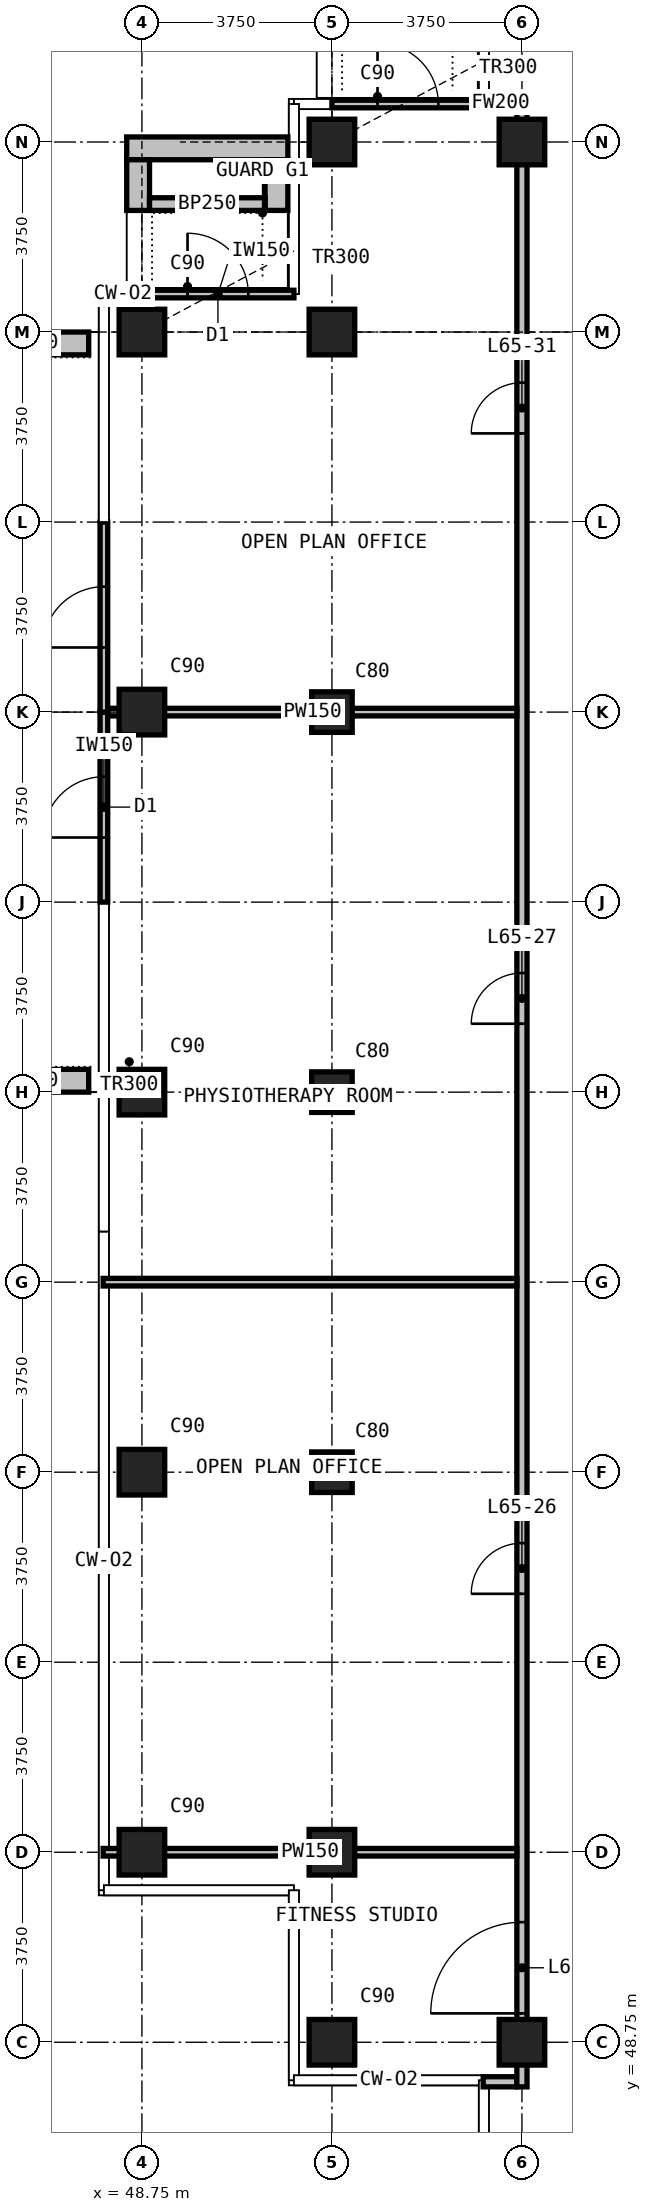
"""IFC4 building model, lengths in metres.
Left out: names, types, materials, properties, quantities, classifications, styles, units other than length and angle.
Written with IfcOpenShell. Run it as: python <this file> out.ifc"""

import sys

from ifc_helpers import new_model, si_unit, direction, frame, frame_2d, origin, origin_2d, place, context, subcontext, project, spatial, rectangle, extrude, element, fill, save


model = new_model("IFC4")
c1 = context("Model", 3, precision=1e-05, world=origin(), true_north=direction((0.0, 1.0)))
c2 = subcontext(c1, "Body", "Model", "MODEL_VIEW")
j1 = project(units=[si_unit("LENGTHUNIT", "METRE"), si_unit("PLANEANGLEUNIT", "RADIAN")], contexts=[c1])
p1 = place(None, origin())
s1 = spatial("IfcSite", under=j1, at=p1, CompositionType="ELEMENT")
p2 = place(p1, origin())
s2 = spatial("IfcBuilding", under=s1, at=p2, CompositionType="ELEMENT")
p3 = place(p2, frame((0.0, 0.0, 249.9)))
s3 = spatial("IfcBuildingStorey", under=s2, at=p3, CompositionType="ELEMENT", Elevation=249.9)
for number, where, z_axis, x_axis in (
    (1, (48.75, 52.5, 0.0), (0.0, 0.0, 1.0), (1.0, 0.0, 0.0)),
    (2, (48.75, 60.0, 0.0), (0.0, 0.0, 1.0), (1.0, 0.0, 0.0)),
    (3, (48.75, 67.5, 0.0), (0.0, 0.0, 1.0), (1.0, 0.0, 0.0)),
    (4, (48.75, 75.0, 0.0), (0.0, 0.0, 1.0), (1.0, 0.0, 0.0)),
    (5, (48.75, 82.5, 0.0), (0.0, 0.0, 1.0), (1.0, 0.0, 0.0)),
    (6, (52.5, 48.75, 0.0), (0.0, 0.0, 1.0), (1.0, 0.0, 0.0)),
    (7, (52.5, 52.5, 0.0), (0.0, 0.0, 1.0), (1.0, 0.0, 0.0)),
):
    element("IfcColumn", number, at=place(p3, frame(where, z_axis=z_axis, x_axis=x_axis)), inside=s3, PredefinedType="COLUMN", context=c2, shape_type="SweptSolid", body=[
        extrude(rectangle(XDim=0.9, YDim=0.9, at=origin_2d()), origin(), (0.0, 0.0, 1.0), 3.6),
    ])
for number, where, z_axis, x_axis in (
    (8, (52.5, 60.0, 0.0), (0.0, 0.0, 1.0), (1.0, 0.0, 0.0)),
    (9, (52.5, 67.5, 0.0), (0.0, 0.0, 1.0), (1.0, 0.0, 0.0)),
    (10, (52.5, 75.0, 0.0), (0.0, 0.0, 1.0), (1.0, 0.0, 0.0)),
):
    element("IfcColumn", number, at=place(p3, frame(where, z_axis=z_axis, x_axis=x_axis)), inside=s3, PredefinedType="COLUMN", context=c2, shape_type="SweptSolid", body=[
        extrude(rectangle(XDim=0.8, YDim=0.8, at=origin_2d()), origin(), (0.0, 0.0, 1.0), 3.6),
    ])
for number, where, z_axis, x_axis in (
    (11, (52.5, 82.5, 0.0), (0.0, 0.0, 1.0), (1.0, 0.0, 0.0)),
    (12, (52.5, 86.25, 0.0), (0.0, 0.0, 1.0), (1.0, 0.0, 0.0)),
    (13, (56.25, 48.75, 0.0), (0.0, 0.0, 1.0), (1.0, 0.0, 0.0)),
    (14, (56.25, 86.25, 0.0), (0.0, 0.0, 1.0), (1.0, 0.0, 0.0)),
):
    element("IfcColumn", number, at=place(p3, frame(where, z_axis=z_axis, x_axis=x_axis)), inside=s3, PredefinedType="COLUMN", context=c2, shape_type="SweptSolid", body=[
        extrude(rectangle(XDim=0.9, YDim=0.9, at=origin_2d()), origin(), (0.0, 0.0, 1.0), 3.6),
    ])
p4 = place(p3, frame((52.5, 87.0, 0.0), z_axis=(0.0, 0.0, 1.0), x_axis=(1.0, 0.0, 0.0)))
e15 = element("IfcWall", 15, at=p4, inside=s3, PredefinedType="SOLIDWALL", context=c2, shape_type="SweptSolid", body=[
    extrude(rectangle(XDim=3.0, YDim=0.15, at=frame_2d((1.5, 0.0))), origin(), (0.0, 0.0, 1.0), 3.25),
])
p5 = place(p4, frame((0.9, 0.0, 0.0)))
e16 = element("IfcOpeningElement", 16, at=p5, cuts=e15, PredefinedType="OPENING", context=c2, shape_type="SweptSolid", body=[
    extrude(rectangle(XDim=1.2, YDim=2.4, at=frame_2d((0.6, 1.2))), frame((0.0, 0.085, 0.0), z_axis=(0.0, -1.0, 0.0), x_axis=(1.0, 0.0, 0.0)), (0.0, 0.0, 1.0), 0.17),
])
p6 = place(p3, frame((48.75, 83.25, 0.0), z_axis=(0.0, 0.0, 1.0), x_axis=(1.0, 0.0, 0.0)))
e17 = element("IfcWall", 17, at=p6, inside=s3, PredefinedType="SOLIDWALL", context=c2, shape_type="SweptSolid", body=[
    extrude(rectangle(XDim=3.0, YDim=0.15, at=frame_2d((1.5, 0.0))), origin(), (0.0, 0.0, 1.0), 3.25),
])
p7 = place(p6, frame((0.9, 0.0, 0.0)))
e18 = element("IfcOpeningElement", 18, at=p7, cuts=e17, PredefinedType="OPENING", context=c2, shape_type="SweptSolid", body=[
    extrude(rectangle(XDim=1.2, YDim=2.4, at=frame_2d((0.6, 1.2))), frame((0.0, 0.085, 0.0), z_axis=(0.0, -1.0, 0.0), x_axis=(1.0, 0.0, 0.0)), (0.0, 0.0, 1.0), 0.17),
])
p8 = place(p3, frame((48.0, 71.25, 0.0), z_axis=(0.0, 0.0, 1.0), x_axis=(0.0, 1.0, 0.0)))
e19 = element("IfcWall", 19, at=p8, inside=s3, PredefinedType="SOLIDWALL", context=c2, shape_type="SweptSolid", body=[
    extrude(rectangle(XDim=3.75, YDim=0.15, at=frame_2d((1.875, 0.0))), origin(), (0.0, 0.0, 1.0), 3.25),
])
p9 = place(p8, frame((1.275, 0.0, 0.0)))
e20 = element("IfcOpeningElement", 20, at=p9, cuts=e19, PredefinedType="OPENING", context=c2, shape_type="SweptSolid", body=[
    extrude(rectangle(XDim=1.2, YDim=2.4, at=frame_2d((0.6, 1.2))), frame((0.0, 0.085, 0.0), z_axis=(0.0, -1.0, 0.0), x_axis=(1.0, 0.0, 0.0)), (0.0, 0.0, 1.0), 0.17),
])
p10 = place(p3, frame((48.0, 75.0, 0.0), z_axis=(0.0, 0.0, 1.0), x_axis=(0.0, 1.0, 0.0)))
e21 = element("IfcWall", 21, at=p10, inside=s3, PredefinedType="SOLIDWALL", context=c2, shape_type="SweptSolid", body=[
    extrude(rectangle(XDim=3.75, YDim=0.15, at=frame_2d((1.875, 0.0))), origin(), (0.0, 0.0, 1.0), 3.25),
])
p11 = place(p10, frame((1.275, 0.0, 0.0)))
e22 = element("IfcOpeningElement", 22, at=p11, cuts=e21, PredefinedType="OPENING", context=c2, shape_type="SweptSolid", body=[
    extrude(rectangle(XDim=1.2, YDim=2.4, at=frame_2d((0.6, 1.2))), frame((0.0, 0.085, 0.0), z_axis=(0.0, -1.0, 0.0), x_axis=(1.0, 0.0, 0.0)), (0.0, 0.0, 1.0), 0.17),
])
p12 = place(p3, frame((48.45, 86.125, 0.0), z_axis=(0.0, 0.0, 1.0), x_axis=(1.0, 0.0, 0.0)))
e23 = element("IfcWall", 23, at=p12, inside=s3, PredefinedType="USERDEFINED", context=c2, shape_type="SweptSolid", body=[
    extrude(rectangle(XDim=3.18, YDim=0.45, at=frame_2d((1.59, 0.0))), origin(), (0.0, 0.0, 1.0), 1.1),
])
for number, where, z_axis, x_axis in (
    (24, (48.675, 84.9, 0.0), (0.0, 0.0, 1.0), (0.0, 1.0, 0.0)),
    (25, (51.405, 84.9, 0.0), (0.0, 0.0, 1.0), (0.0, 1.0, 0.0)),
):
    element("IfcWall", number, at=place(p3, frame(where, z_axis=z_axis, x_axis=x_axis)), inside=s3, PredefinedType="USERDEFINED", context=c2, shape_type="SweptSolid", body=[
        extrude(rectangle(XDim=1.0, YDim=0.45, at=frame_2d((0.5, 0.0))), origin(), (0.0, 0.0, 1.0), 1.1),
    ])
p13 = place(p3, frame((48.9, 85.025, 0.0), z_axis=(0.0, 0.0, 1.0), x_axis=(1.0, 0.0, 0.0)))
e26 = element("IfcWall", 26, at=p13, inside=s3, PredefinedType="USERDEFINED", context=c2, shape_type="SweptSolid", body=[
    extrude(rectangle(XDim=2.28, YDim=0.25, at=frame_2d((1.14, 0.0))), origin(), (0.0, 0.0, 1.0), 1.0),
])
for number, where, z_axis, x_axis in (
    (27, (47.7, 67.725, 0.0), (0.0, 0.0, 1.0), (-1.0, 0.0, 0.0)),
    (28, (47.7, 82.275, 0.0), (0.0, 0.0, 1.0), (-1.0, 0.0, 0.0)),
):
    element("IfcWall", number, at=place(p3, frame(where, z_axis=z_axis, x_axis=x_axis)), inside=s3, PredefinedType="USERDEFINED", context=c2, shape_type="SweptSolid", body=[
        extrude(rectangle(XDim=2.35, YDim=0.45, at=frame_2d((1.175, 0.0))), origin(), (0.0, 0.0, 1.0), 1.1),
    ])
p14 = place(p3, frame((55.485, 47.97, 0.0), z_axis=(0.0, 0.0, 1.0), x_axis=(1.0, 0.0, 0.0)))
e29 = element("IfcWall", 29, at=p14, inside=s3, PredefinedType="PARTITIONING", context=c2, shape_type="SweptSolid", body=[
    extrude(rectangle(XDim=0.665, YDim=0.2, at=frame_2d((0.333, 0.0))), origin(), (0.0, 0.0, 1.0), 3.25),
])
p15 = place(p3, frame((55.51, 87.03, 0.0), z_axis=(0.0, 0.0, 1.0), x_axis=(1.0, 0.0, 0.0)))
e30 = element("IfcWall", 30, at=p15, inside=s3, PredefinedType="PARTITIONING", context=c2, shape_type="SweptSolid", body=[
    extrude(rectangle(XDim=0.64, YDim=0.2, at=frame_2d((0.32, 0.0))), origin(), (0.0, 0.0, 1.0), 3.25),
])
p16 = place(p3, frame((56.25, 47.87, 0.0), z_axis=(0.0, 0.0, 1.0), x_axis=(0.0, 1.0, 0.0)))
e31 = element("IfcWall", 31, at=p16, inside=s3, PredefinedType="PARTITIONING", context=c2, shape_type="SweptSolid", body=[
    extrude(rectangle(XDim=39.26, YDim=0.2, at=frame_2d((19.63, 0.0))), origin(), (0.0, 0.0, 1.0), 3.25),
])
p17 = place(p16, frame((1.45, 0.0, 0.0)))
e32 = element("IfcOpeningElement", 32, at=p17, cuts=e31, PredefinedType="OPENING", context=c2, shape_type="SweptSolid", body=[
    extrude(rectangle(XDim=1.8, YDim=2.2, at=frame_2d((0.9, 1.1))), frame((0.0, 0.11, 0.0), z_axis=(0.0, -1.0, 0.0), x_axis=(1.0, 0.0, 0.0)), (0.0, 0.0, 1.0), 0.22),
])
p18 = place(p16, frame((9.73, 0.0, 0.0)))
e33 = element("IfcOpeningElement", 33, at=p18, cuts=e31, PredefinedType="OPENING", context=c2, shape_type="SweptSolid", body=[
    extrude(rectangle(XDim=1.0, YDim=2.2, at=frame_2d((0.5, 1.1))), frame((0.0, 0.11, 0.0), z_axis=(0.0, -1.0, 0.0), x_axis=(1.0, 0.0, 0.0)), (0.0, 0.0, 1.0), 0.22),
])
p19 = place(p16, frame((20.98, 0.0, 0.0)))
e34 = element("IfcOpeningElement", 34, at=p19, cuts=e31, PredefinedType="OPENING", context=c2, shape_type="SweptSolid", body=[
    extrude(rectangle(XDim=1.0, YDim=2.2, at=frame_2d((0.5, 1.1))), frame((0.0, 0.11, 0.0), z_axis=(0.0, -1.0, 0.0), x_axis=(1.0, 0.0, 0.0)), (0.0, 0.0, 1.0), 0.22),
])
p20 = place(p16, frame((32.63, 0.0, 0.0)))
e35 = element("IfcOpeningElement", 35, at=p20, cuts=e31, PredefinedType="OPENING", context=c2, shape_type="SweptSolid", body=[
    extrude(rectangle(XDim=1.0, YDim=2.2, at=frame_2d((0.5, 1.1))), frame((0.0, 0.11, 0.0), z_axis=(0.0, -1.0, 0.0), x_axis=(1.0, 0.0, 0.0)), (0.0, 0.0, 1.0), 0.22),
])
for number, where, z_axis, x_axis in (
    (36, (47.985, 52.5, 0.0), (0.0, 0.0, 1.0), (1.0, 0.0, 0.0)),
    (37, (47.985, 63.75, 0.0), (0.0, 0.0, 1.0), (1.0, 0.0, 0.0)),
):
    element("IfcWall", number, at=place(p3, frame(where, z_axis=z_axis, x_axis=x_axis)), inside=s3, PredefinedType="PARTITIONING", context=c2, shape_type="SweptSolid", body=[
        extrude(rectangle(XDim=8.165, YDim=0.15, at=frame_2d((4.083, 0.0))), origin(), (0.0, 0.0, 1.0), 3.25),
    ])
p21 = place(p3, frame((48.085, 75.0, 0.0), z_axis=(0.0, 0.0, 1.0), x_axis=(1.0, 0.0, 0.0)))
e38 = element("IfcWall", 38, at=p21, inside=s3, PredefinedType="PARTITIONING", context=c2, shape_type="SweptSolid", body=[
    extrude(rectangle(XDim=8.065, YDim=0.15, at=frame_2d((4.032, 0.0))), origin(), (0.0, 0.0, 1.0), 3.25),
])
p22 = place(p5, origin())
e39 = element("IfcDoor", 39, at=p22, inside=s3, OperationType="SINGLE_SWING_LEFT", PredefinedType="DOOR", context=c2, shape_type="SweptSolid", body=[
    extrude(rectangle(XDim=1.2, YDim=2.4, at=frame_2d((0.6, 1.2))), frame((0.0, 0.025, 0.0), z_axis=(0.0, -1.0, 0.0), x_axis=(1.0, 0.0, 0.0)), (0.0, 0.0, 1.0), 0.05),
])
fill(e16, e39)
p23 = place(p7, origin())
e40 = element("IfcDoor", 40, at=p23, inside=s3, OperationType="SINGLE_SWING_LEFT", PredefinedType="DOOR", context=c2, shape_type="SweptSolid", body=[
    extrude(rectangle(XDim=1.2, YDim=2.4, at=frame_2d((0.6, 1.2))), frame((0.0, 0.025, 0.0), z_axis=(0.0, -1.0, 0.0), x_axis=(1.0, 0.0, 0.0)), (0.0, 0.0, 1.0), 0.05),
])
fill(e18, e40)
p24 = place(p9, origin())
e41 = element("IfcDoor", 41, at=p24, inside=s3, OperationType="SINGLE_SWING_LEFT", PredefinedType="DOOR", context=c2, shape_type="SweptSolid", body=[
    extrude(rectangle(XDim=1.2, YDim=2.4, at=frame_2d((0.6, 1.2))), frame((0.0, 0.025, 0.0), z_axis=(0.0, -1.0, 0.0), x_axis=(1.0, 0.0, 0.0)), (0.0, 0.0, 1.0), 0.05),
])
fill(e20, e41)
p25 = place(p11, origin())
e42 = element("IfcDoor", 42, at=p25, inside=s3, OperationType="SINGLE_SWING_LEFT", PredefinedType="DOOR", context=c2, shape_type="SweptSolid", body=[
    extrude(rectangle(XDim=1.2, YDim=2.4, at=frame_2d((0.6, 1.2))), frame((0.0, 0.025, 0.0), z_axis=(0.0, -1.0, 0.0), x_axis=(1.0, 0.0, 0.0)), (0.0, 0.0, 1.0), 0.05),
])
fill(e22, e42)
p26 = place(p17, origin())
e43 = element("IfcDoor", 43, at=p26, inside=s3, OperationType="DOUBLE_DOOR_SINGLE_SWING", PredefinedType="DOOR", context=c2, shape_type="SweptSolid", body=[
    extrude(rectangle(XDim=1.8, YDim=2.2, at=frame_2d((0.9, 1.1))), frame((0.0, 0.025, 0.0), z_axis=(0.0, -1.0, 0.0), x_axis=(1.0, 0.0, 0.0)), (0.0, 0.0, 1.0), 0.05),
])
fill(e32, e43)
p27 = place(p18, origin())
e44 = element("IfcDoor", 44, at=p27, inside=s3, OperationType="SINGLE_SWING_LEFT", PredefinedType="DOOR", context=c2, shape_type="SweptSolid", body=[
    extrude(rectangle(XDim=1.0, YDim=2.2, at=frame_2d((0.5, 1.1))), frame((0.0, 0.025, 0.0), z_axis=(0.0, -1.0, 0.0), x_axis=(1.0, 0.0, 0.0)), (0.0, 0.0, 1.0), 0.05),
])
fill(e33, e44)
p28 = place(p19, origin())
e45 = element("IfcDoor", 45, at=p28, inside=s3, OperationType="SINGLE_SWING_LEFT", PredefinedType="DOOR", context=c2, shape_type="SweptSolid", body=[
    extrude(rectangle(XDim=1.0, YDim=2.2, at=frame_2d((0.5, 1.1))), frame((0.0, 0.025, 0.0), z_axis=(0.0, -1.0, 0.0), x_axis=(1.0, 0.0, 0.0)), (0.0, 0.0, 1.0), 0.05),
])
fill(e34, e45)
p29 = place(p20, origin())
e46 = element("IfcDoor", 46, at=p29, inside=s3, OperationType="SINGLE_SWING_RIGHT", PredefinedType="DOOR", context=c2, shape_type="SweptSolid", body=[
    extrude(rectangle(XDim=1.0, YDim=2.2, at=frame_2d((0.5, 1.1))), frame((0.0, 0.025, 0.0), z_axis=(0.0, -1.0, 0.0), x_axis=(1.0, 0.0, 0.0)), (0.0, 0.0, 1.0), 0.05),
])
fill(e35, e46)
save(model, sys.argv[1])
